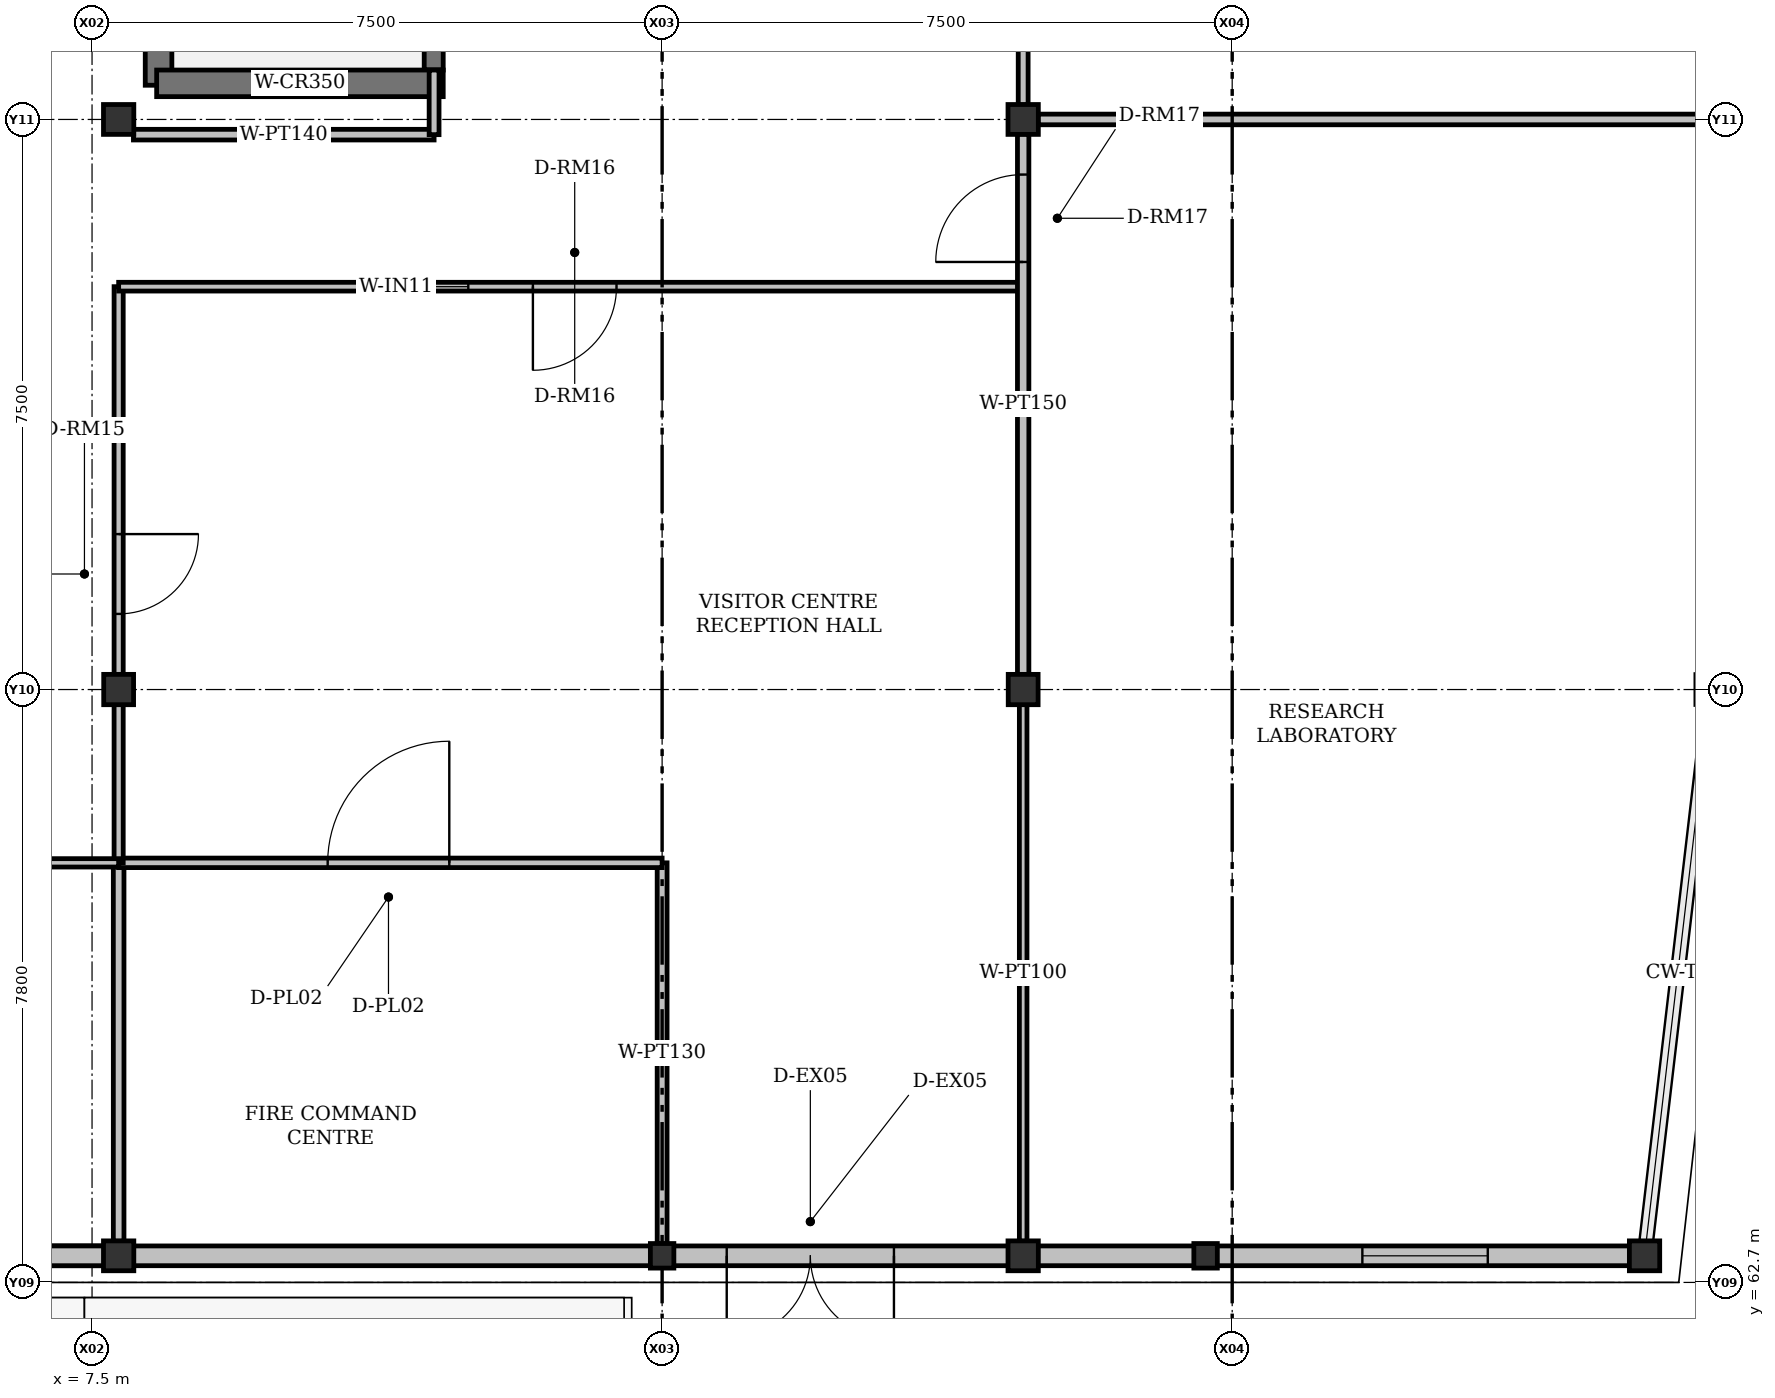
"""IFC4 building model, lengths in metres.
Left out: names, types, materials, properties, quantities, classifications, styles, units other than length and angle.
Written with IfcOpenShell. Run it as: python <this file> out.ifc"""

import sys

from ifc_helpers import new_model, si_unit, direction, frame, frame_2d, origin, origin_2d, place, context, subcontext, project, spatial, rectangle, i_section, extrude, element, fill, save


model = new_model("IFC4")
c1 = context("Model", 3, precision=1e-05, world=origin(), true_north=direction((0.0, 1.0)))
c2 = subcontext(c1, "Body", "Model", "MODEL_VIEW")
j1 = project(units=[si_unit("LENGTHUNIT", "METRE"), si_unit("PLANEANGLEUNIT", "RADIAN")], contexts=[c1])
p1 = place(None, origin())
s1 = spatial("IfcSite", under=j1, at=p1, CompositionType="ELEMENT")
p2 = place(p1, origin())
s2 = spatial("IfcBuilding", under=s1, at=p2, CompositionType="ELEMENT")
p3 = place(p2, origin())
s3 = spatial("IfcBuildingStorey", under=s2, at=p3, CompositionType="ELEMENT", Elevation=0.0)
for number, where, z_axis, x_axis in (
    (1, (7.85, 63.05, 0.0), (0.0, 0.0, 1.0), (1.0, 0.0, 0.0)),
    (2, (19.75, 63.05, 0.0), (0.0, 0.0, 1.0), (1.0, 0.0, 0.0)),
    (3, (27.925, 63.05, 0.0), (0.0, 0.0, 1.0), (1.0, 0.0, 0.0)),
    (4, (7.85, 70.5, 0.0), (0.0, 0.0, 1.0), (0.0, 1.0, 0.0)),
    (5, (19.75, 70.5, 0.0), (0.0, 0.0, 1.0), (0.0, 1.0, 0.0)),
    (6, (7.85, 78.0, 0.0), (0.0, 0.0, 1.0), (1.0, 0.0, 0.0)),
    (7, (19.75, 78.0, 0.0), (0.0, 0.0, 1.0), (1.0, 0.0, 0.0)),
):
    element("IfcColumn", number, at=place(p3, frame(where, z_axis=z_axis, x_axis=x_axis)), inside=s3, PredefinedType="COLUMN", context=c2, shape_type="SweptSolid", body=[
        extrude(i_section(OverallWidth=0.399, OverallDepth=0.393, WebThickness=0.023, FlangeThickness=0.036, FilletRadius=0.015, at=origin_2d()), origin(), (0.0, 0.0, 1.0), 5.4),
    ])
for number, where, z_axis, x_axis in (
    (8, (15.0, 63.05, 0.0), (0.0, 0.0, 1.0), (1.0, 0.0, 0.0)),
    (9, (22.15, 63.05, 0.0), (0.0, 0.0, 1.0), (1.0, 0.0, 0.0)),
):
    element("IfcColumn", number, at=place(p3, frame(where, z_axis=z_axis, x_axis=x_axis)), inside=s3, PredefinedType="COLUMN", context=c2, shape_type="SweptSolid", body=[
        extrude(i_section(OverallWidth=0.309, OverallDepth=0.323, WebThickness=0.014, FlangeThickness=0.023, FilletRadius=0.015, at=origin_2d()), origin(), (0.0, 0.0, 1.0), 5.4),
    ])
p4 = place(p3, frame((7.85, 63.05, 0.0), z_axis=(0.0, 0.0, 1.0), x_axis=(-1.0, 0.0, 0.0)))
e10 = element("IfcWall", 10, at=p4, inside=s3, PredefinedType="SOLIDWALL", context=c2, shape_type="SweptSolid", body=[
    extrude(rectangle(XDim=7.3, YDim=0.26, at=frame_2d((3.65, 0.0))), origin(), (0.0, 0.0, 1.0), 3.883),
])
p5 = place(p4, frame((2.65, 0.0, 0.0)))
e11 = element("IfcOpeningElement", 11, at=p5, cuts=e10, PredefinedType="OPENING", context=c2, shape_type="SweptSolid", body=[
    extrude(rectangle(XDim=3.8, YDim=3.4, at=frame_2d((1.9, 1.7))), frame((0.0, 0.13, 0.0), z_axis=(0.0, -1.0, 0.0), x_axis=(1.0, 0.0, 0.0)), (0.0, 0.0, 1.0), 0.26),
])
p6 = place(p3, frame((0.55, 63.05, 4.102), z_axis=(0.0, 0.0, 1.0), x_axis=(1.0, 0.0, 0.0)))
e12 = element("IfcWall", 12, at=p6, inside=s3, PredefinedType="SOLIDWALL", context=c2, shape_type="SweptSolid", body=[
    extrude(rectangle(XDim=7.3, YDim=0.26, at=frame_2d((3.65, 0.0))), origin(), (0.0, 0.0, 1.0), 0.675),
])
p7 = place(p3, frame((19.75, 63.05, 0.0), z_axis=(0.0, 0.0, 1.0), x_axis=(-1.0, 0.0, 0.0)))
e13 = element("IfcWall", 13, at=p7, inside=s3, PredefinedType="SOLIDWALL", context=c2, shape_type="SweptSolid", body=[
    extrude(rectangle(XDim=11.9, YDim=0.26, at=frame_2d((5.95, 0.0))), origin(), (0.0, 0.0, 1.0), 4.7),
])
p8 = place(p7, frame((1.7, 0.0, 0.0)))
e14 = element("IfcOpeningElement", 14, at=p8, cuts=e13, PredefinedType="OPENING", context=c2, shape_type="SweptSolid", body=[
    extrude(rectangle(XDim=2.2, YDim=2.4, at=frame_2d((1.1, 1.2))), frame((0.0, 0.13, 0.0), z_axis=(0.0, -1.0, 0.0), x_axis=(1.0, 0.0, 0.0)), (0.0, 0.0, 1.0), 0.26),
])
p9 = place(p3, frame((22.15, 63.05, 0.0), z_axis=(0.0, 0.0, 1.0), x_axis=(-1.0, 0.0, 0.0)))
e15 = element("IfcWall", 15, at=p9, inside=s3, PredefinedType="SOLIDWALL", context=c2, shape_type="SweptSolid", body=[
    extrude(rectangle(XDim=2.4, YDim=0.26, at=frame_2d((1.2, 0.0))), origin(), (0.0, 0.0, 1.0), 4.7),
])
p10 = place(p3, frame((27.925, 63.05, 0.0), z_axis=(0.0, 0.0, 1.0), x_axis=(-1.0, 0.0, 0.0)))
e16 = element("IfcWall", 16, at=p10, inside=s3, PredefinedType="SOLIDWALL", context=c2, shape_type="SweptSolid", body=[
    extrude(rectangle(XDim=5.775, YDim=0.26, at=frame_2d((2.888, 0.0))), origin(), (0.0, 0.0, 1.0), 4.7),
])
p11 = place(p10, frame((2.062, 0.0, 0.92)))
e17 = element("IfcOpeningElement", 17, at=p11, cuts=e16, PredefinedType="OPENING", context=c2, shape_type="SweptSolid", body=[
    extrude(rectangle(XDim=1.65, YDim=1.4, at=frame_2d((0.825, 0.7))), frame((0.0, 0.13, 0.0), z_axis=(0.0, -1.0, 0.0), x_axis=(1.0, 0.0, 0.0)), (0.0, 0.0, 1.0), 0.26),
])
p12 = place(p3, frame((8.375, 78.45, 0.0), z_axis=(0.0, 0.0, 1.0), x_axis=(0.0, 1.0, 0.0)))
e18 = element("IfcWall", 18, at=p12, inside=s3, PredefinedType="SHEAR", context=c2, shape_type="SweptSolid", body=[
    extrude(rectangle(XDim=8.175, YDim=0.35, at=frame_2d((4.087, 0.0))), origin(), (0.0, 0.0, 1.0), 5.4),
])
p13 = place(p3, frame((11.995, 78.65, 0.0), z_axis=(0.0, 0.0, 1.0), x_axis=(0.0, 1.0, 0.0)))
e19 = element("IfcWall", 19, at=p13, inside=s3, PredefinedType="SHEAR", context=c2, shape_type="SweptSolid", body=[
    extrude(rectangle(XDim=7.85, YDim=0.25, at=frame_2d((3.925, 0.0))), origin(), (0.0, 0.0, 1.0), 5.4),
])
p14 = place(p3, frame((8.35, 78.475, 0.0), z_axis=(0.0, 0.0, 1.0), x_axis=(1.0, 0.0, 0.0)))
e20 = element("IfcWall", 20, at=p14, inside=s3, PredefinedType="SHEAR", context=c2, shape_type="SweptSolid", body=[
    extrude(rectangle(XDim=3.77, YDim=0.35, at=frame_2d((1.885, 0.0))), origin(), (0.0, 0.0, 1.0), 5.4),
])
p15 = place(p3, frame((8.044, 77.8, 0.0), z_axis=(0.0, 0.0, 1.0), x_axis=(1.0, 0.0, 0.0)))
e21 = element("IfcWall", 21, at=p15, inside=s3, PredefinedType="PARTITIONING", context=c2, shape_type="SweptSolid", body=[
    extrude(rectangle(XDim=3.956, YDim=0.14, at=frame_2d((1.978, 0.0))), origin(), (0.0, 0.0, 1.0), 4.651),
])
p16 = place(p3, frame((12.0, 77.8, 0.0), z_axis=(0.0, 0.0, 1.0), x_axis=(0.0, 1.0, 0.0)))
e22 = element("IfcWall", 22, at=p16, inside=s3, PredefinedType="PARTITIONING", context=c2, shape_type="SweptSolid", body=[
    extrude(rectangle(XDim=0.85, YDim=0.13, at=frame_2d((0.425, 0.0))), origin(), (0.0, 0.0, 1.0), 4.651),
])
p17 = place(p3, frame((7.85, 63.241, 0.0), z_axis=(0.0, 0.0, 1.0), x_axis=(0.0, 1.0, 0.0)))
e23 = element("IfcWall", 23, at=p17, inside=s3, PredefinedType="PARTITIONING", context=c2, shape_type="SweptSolid", body=[
    extrude(rectangle(XDim=4.979, YDim=0.14, at=frame_2d((2.489, 0.0))), origin(), (0.0, 0.0, 1.0), 4.727),
])
p18 = place(p3, frame((15.0, 63.207, 0.0), z_axis=(0.0, 0.0, 1.0), x_axis=(0.0, 1.0, 0.0)))
e24 = element("IfcWall", 24, at=p18, inside=s3, PredefinedType="PARTITIONING", context=c2, shape_type="SweptSolid", body=[
    extrude(rectangle(XDim=5.013, YDim=0.13, at=frame_2d((2.507, 0.0))), origin(), (0.0, 0.0, 1.0), 4.877),
])
p19 = place(p3, frame((7.85, 68.22, 0.0), z_axis=(0.0, 0.0, 1.0), x_axis=(1.0, 0.0, 0.0)))
e25 = element("IfcWall", 25, at=p19, inside=s3, PredefinedType="PARTITIONING", context=c2, shape_type="SweptSolid", body=[
    extrude(rectangle(XDim=7.15, YDim=0.125, at=frame_2d((3.575, 0.0))), origin(), (0.0, 0.0, 1.0), 4.727),
])
p20 = place(p19, frame((2.75, 0.0, 0.0)))
e26 = element("IfcOpeningElement", 26, at=p20, cuts=e25, PredefinedType="OPENING", context=c2, shape_type="SweptSolid", body=[
    extrude(rectangle(XDim=1.6, YDim=2.25, at=frame_2d((0.8, 1.125))), frame((0.0, 0.062, 0.0), z_axis=(0.0, -1.0, 0.0), x_axis=(1.0, 0.0, 0.0)), (0.0, 0.0, 1.0), 0.125),
])
p21 = place(p3, frame((7.85, 75.8, 0.0), z_axis=(0.0, 0.0, 1.0), x_axis=(0.0, -1.0, 0.0)))
e27 = element("IfcWall", 27, at=p21, inside=s3, PredefinedType="PARTITIONING", context=c2, shape_type="SweptSolid", body=[
    extrude(rectangle(XDim=7.58, YDim=0.12, at=frame_2d((3.79, 0.0))), origin(), (0.0, 0.0, 1.0), 4.727),
])
p22 = place(p21, frame((3.255, 0.0, 0.0)))
e28 = element("IfcOpeningElement", 28, at=p22, cuts=e27, PredefinedType="OPENING", context=c2, shape_type="SweptSolid", body=[
    extrude(rectangle(XDim=1.05, YDim=2.2, at=frame_2d((0.525, 1.1))), frame((0.0, 0.06, 0.0), z_axis=(0.0, -1.0, 0.0), x_axis=(1.0, 0.0, 0.0)), (0.0, 0.0, 1.0), 0.12),
])
p23 = place(p3, frame((19.75, 75.8, 0.0), z_axis=(0.0, 0.0, 1.0), x_axis=(-1.0, 0.0, 0.0)))
e29 = element("IfcWall", 29, at=p23, inside=s3, PredefinedType="PARTITIONING", context=c2, shape_type="SweptSolid", body=[
    extrude(rectangle(XDim=11.9, YDim=0.115, at=frame_2d((5.95, 0.0))), origin(), (0.0, 0.0, 1.0), 4.727),
])
p24 = place(p23, frame((5.35, 0.0, 0.0)))
e30 = element("IfcOpeningElement", 30, at=p24, cuts=e29, PredefinedType="OPENING", context=c2, shape_type="SweptSolid", body=[
    extrude(rectangle(XDim=1.1, YDim=2.2, at=frame_2d((0.55, 1.1))), frame((0.0, 0.058, 0.0), z_axis=(0.0, -1.0, 0.0), x_axis=(1.0, 0.0, 0.0)), (0.0, 0.0, 1.0), 0.115),
])
p25 = place(p23, frame((7.3, 0.0, 0.92)))
e31 = element("IfcOpeningElement", 31, at=p25, cuts=e29, PredefinedType="OPENING", context=c2, shape_type="SweptSolid", body=[
    extrude(rectangle(XDim=1.3, YDim=1.3, at=frame_2d((0.65, 0.65))), frame((0.0, 0.058, 0.0), z_axis=(0.0, -1.0, 0.0), x_axis=(1.0, 0.0, 0.0)), (0.0, 0.0, 1.0), 0.115),
])
p26 = place(p3, frame((5.55, 68.22, 0.0), z_axis=(0.0, 0.0, 1.0), x_axis=(1.0, 0.0, 0.0)))
e32 = element("IfcWall", 32, at=p26, inside=s3, PredefinedType="PARTITIONING", context=c2, shape_type="SweptSolid", body=[
    extrude(rectangle(XDim=2.3, YDim=0.11, at=frame_2d((1.15, 0.0))), origin(), (0.0, 0.0, 1.0), 4.727),
])
p27 = place(p3, frame((19.75, 63.241, 0.0), z_axis=(0.0, 0.0, 1.0), x_axis=(0.0, 1.0, 0.0)))
e33 = element("IfcWall", 33, at=p27, inside=s3, PredefinedType="PARTITIONING", context=c2, shape_type="SweptSolid", body=[
    extrude(rectangle(XDim=7.064, YDim=0.1, at=frame_2d((3.532, 0.0))), origin(), (0.0, 0.0, 1.0), 4.727),
])
p28 = place(p3, frame((19.75, 70.695, 0.0), z_axis=(0.0, 0.0, 1.0), x_axis=(0.0, 1.0, 0.0)))
e34 = element("IfcWall", 34, at=p28, inside=s3, PredefinedType="PARTITIONING", context=c2, shape_type="SweptSolid", body=[
    extrude(rectangle(XDim=7.114, YDim=0.15, at=frame_2d((3.557, 0.0))), origin(), (0.0, 0.0, 1.0), 4.727),
])
p29 = place(p28, frame((5.43, 0.0, 0.0)))
e35 = element("IfcOpeningElement", 35, at=p29, cuts=e34, PredefinedType="OPENING", context=c2, shape_type="SweptSolid", body=[
    extrude(rectangle(XDim=1.15, YDim=2.2, at=frame_2d((0.575, 1.1))), frame((0.0, 0.075, 0.0), z_axis=(0.0, -1.0, 0.0), x_axis=(1.0, 0.0, 0.0)), (0.0, 0.0, 1.0), 0.15),
])
p30 = place(p3, frame((19.945, 78.0, 0.0), z_axis=(0.0, 0.0, 1.0), x_axis=(1.0, 0.0, 0.0)))
e36 = element("IfcWall", 36, at=p30, inside=s3, PredefinedType="PARTITIONING", context=c2, shape_type="SweptSolid", body=[
    extrude(rectangle(XDim=9.161, YDim=0.14, at=frame_2d((4.581, 0.0))), origin(), (0.0, 0.0, 1.0), 4.651),
])
p31 = place(p3, frame((19.75, 85.006, 0.0), z_axis=(0.0, 0.0, 1.0), x_axis=(0.0, -1.0, 0.0)))
e37 = element("IfcWall", 37, at=p31, inside=s3, PredefinedType="PARTITIONING", context=c2, shape_type="SweptSolid", body=[
    extrude(rectangle(XDim=6.814, YDim=0.13, at=frame_2d((3.407, 0.0))), origin(), (0.0, 0.0, 1.0), 4.727),
])
p32 = place(p8, origin())
e38 = element("IfcDoor", 38, at=p32, inside=s3, OperationType="DOUBLE_DOOR_SINGLE_SWING", PredefinedType="DOOR", context=c2, shape_type="SweptSolid", body=[
    extrude(rectangle(XDim=2.2, YDim=2.4, at=frame_2d((1.1, 1.2))), frame((0.0, 0.025, 0.0), z_axis=(0.0, -1.0, 0.0), x_axis=(1.0, 0.0, 0.0)), (0.0, 0.0, 1.0), 0.05),
])
fill(e14, e38)
p33 = place(p11, origin())
e39 = element("IfcWindow", 39, at=p33, inside=s3, PartitioningType="DOUBLE_PANEL_VERTICAL", PredefinedType="WINDOW", context=c2, shape_type="SweptSolid", body=[
    extrude(rectangle(XDim=1.65, YDim=1.4, at=frame_2d((0.825, 0.7))), frame((0.0, 0.03, 0.0), z_axis=(0.0, -1.0, 0.0), x_axis=(1.0, 0.0, 0.0)), (0.0, 0.0, 1.0), 0.06),
])
fill(e17, e39)
p34 = place(p20, origin())
e40 = element("IfcDoor", 40, at=p34, inside=s3, OperationType="SINGLE_SWING_RIGHT", PredefinedType="DOOR", context=c2, shape_type="SweptSolid", body=[
    extrude(rectangle(XDim=1.6, YDim=2.25, at=frame_2d((0.8, 1.125))), frame((0.0, 0.025, 0.0), z_axis=(0.0, -1.0, 0.0), x_axis=(1.0, 0.0, 0.0)), (0.0, 0.0, 1.0), 0.05),
])
fill(e26, e40)
p35 = place(p22, origin())
e41 = element("IfcDoor", 41, at=p35, inside=s3, OperationType="SINGLE_SWING_LEFT", PredefinedType="DOOR", context=c2, shape_type="SweptSolid", body=[
    extrude(rectangle(XDim=1.05, YDim=2.2, at=frame_2d((0.525, 1.1))), frame((0.0, 0.025, 0.0), z_axis=(0.0, -1.0, 0.0), x_axis=(1.0, 0.0, 0.0)), (0.0, 0.0, 1.0), 0.05),
])
fill(e28, e41)
p36 = place(p24, origin())
e42 = element("IfcDoor", 42, at=p36, inside=s3, OperationType="SINGLE_SWING_RIGHT", PredefinedType="DOOR", context=c2, shape_type="SweptSolid", body=[
    extrude(rectangle(XDim=1.1, YDim=2.2, at=frame_2d((0.55, 1.1))), frame((0.0, 0.025, 0.0), z_axis=(0.0, -1.0, 0.0), x_axis=(1.0, 0.0, 0.0)), (0.0, 0.0, 1.0), 0.05),
])
fill(e30, e42)
p37 = place(p25, origin())
e43 = element("IfcWindow", 43, at=p37, inside=s3, PartitioningType="SINGLE_PANEL", PredefinedType="WINDOW", context=c2, shape_type="SweptSolid", body=[
    extrude(rectangle(XDim=1.3, YDim=1.3, at=frame_2d((0.65, 0.65))), frame((0.0, 0.03, 0.0), z_axis=(0.0, -1.0, 0.0), x_axis=(1.0, 0.0, 0.0)), (0.0, 0.0, 1.0), 0.06),
])
fill(e31, e43)
p38 = place(p29, origin())
e44 = element("IfcDoor", 44, at=p38, inside=s3, OperationType="SINGLE_SWING_LEFT", PredefinedType="DOOR", context=c2, shape_type="SweptSolid", body=[
    extrude(rectangle(XDim=1.15, YDim=2.2, at=frame_2d((0.575, 1.1))), frame((0.0, 0.025, 0.0), z_axis=(0.0, -1.0, 0.0), x_axis=(1.0, 0.0, 0.0)), (0.0, 0.0, 1.0), 0.05),
])
fill(e35, e44)
save(model, sys.argv[1])
